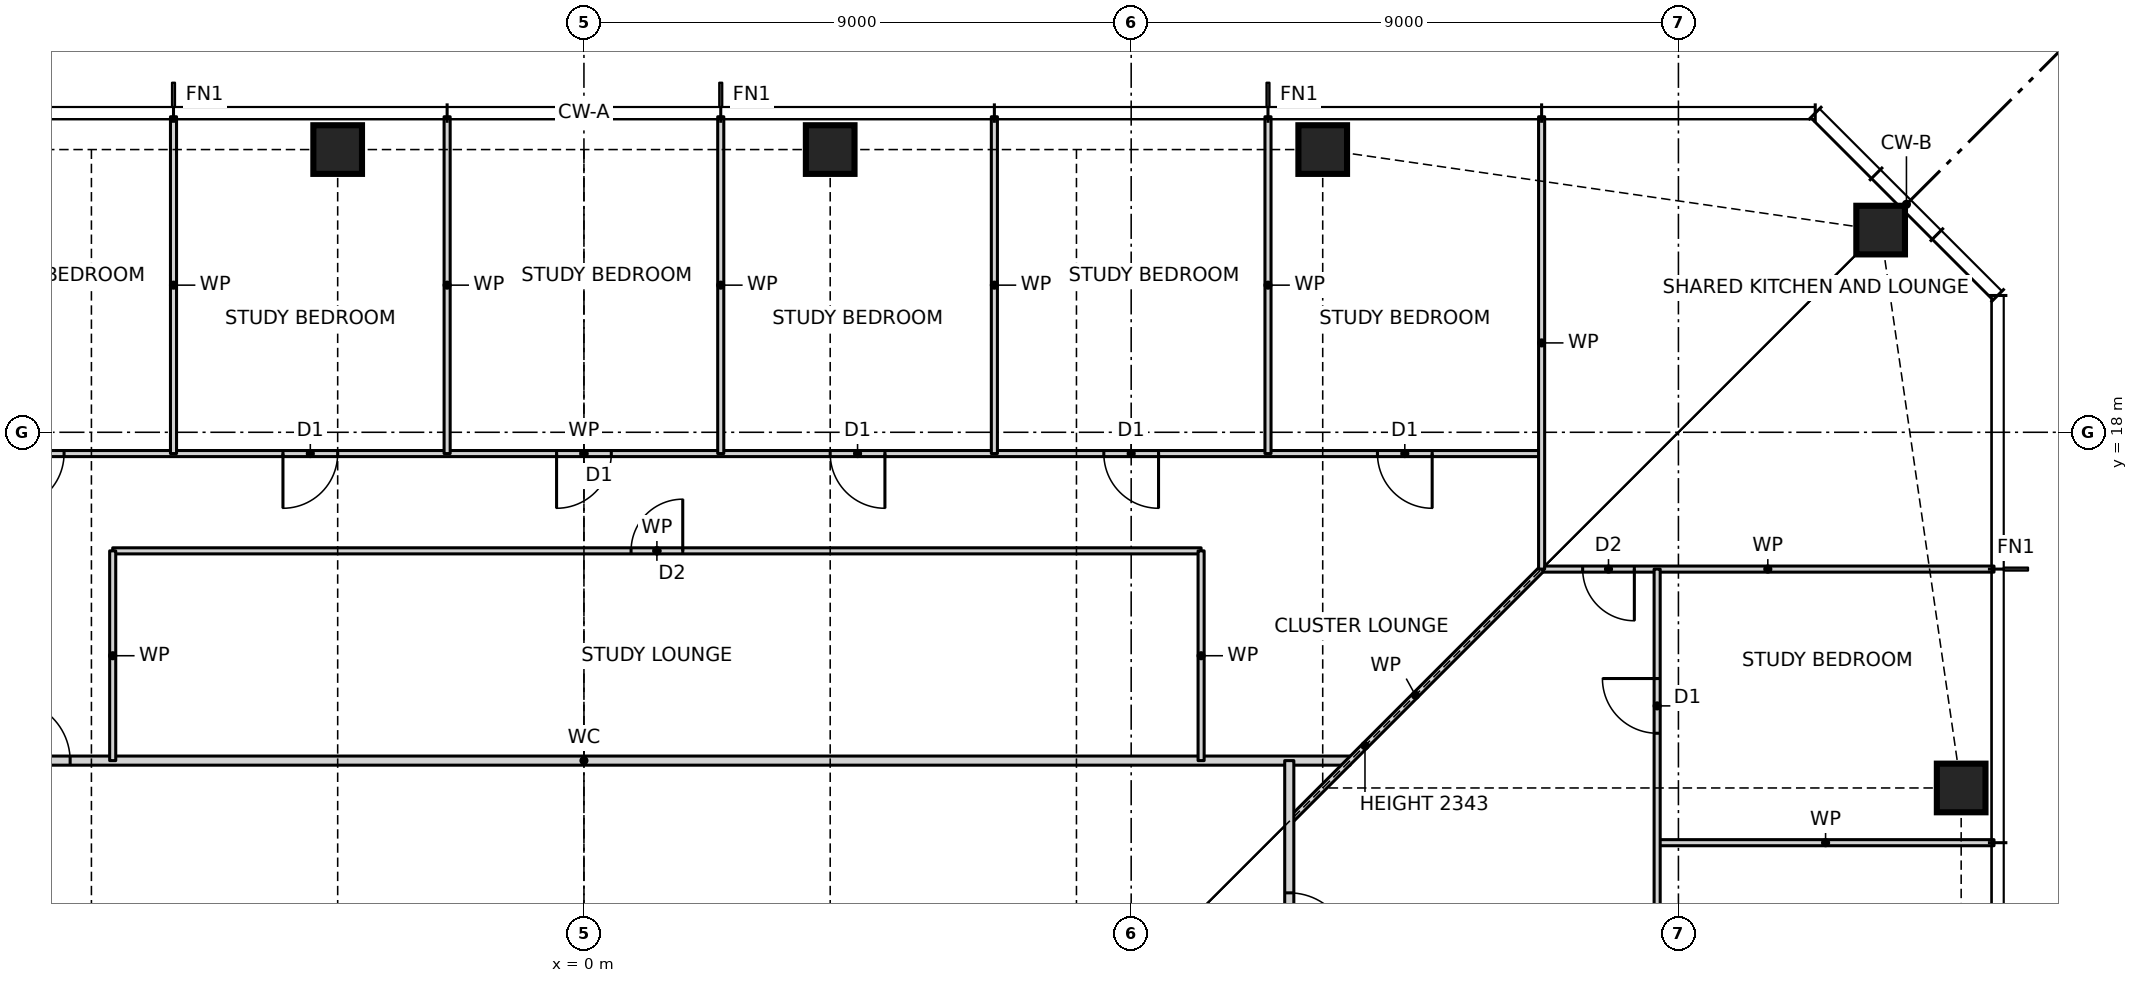
"""IFC4 building model, lengths in metres.
Left out: names, types, materials, properties, quantities, classifications, styles, units other than length and angle.
Written with IfcOpenShell. Run it as: python <this file> out.ifc"""

import sys

from ifc_helpers import new_model, si_unit, direction, frame, frame_2d, origin, origin_2d, place, context, subcontext, project, spatial, rectangle, hollow_rectangle, extrude, element, fill, save


model = new_model("IFC4")
c1 = context("Model", 3, precision=1e-05, world=origin(), true_north=direction((0.0, 1.0)))
c2 = subcontext(c1, "Body", "Model", "MODEL_VIEW")
j1 = project(units=[si_unit("LENGTHUNIT", "METRE"), si_unit("PLANEANGLEUNIT", "RADIAN")], contexts=[c1])
p1 = place(None, origin())
s1 = spatial("IfcSite", under=j1, at=p1, CompositionType="ELEMENT")
p2 = place(p1, origin())
s2 = spatial("IfcBuilding", under=s1, at=p2, CompositionType="ELEMENT")
p3 = place(p2, frame((0.0, 0.0, 43.0)))
s3 = spatial("IfcBuildingStorey", under=s2, at=p3, CompositionType="ELEMENT", Elevation=43.0)
for number, where, z_axis, x_axis in (
    (1, (22.65, 12.15, 0.0), (0.0, 0.0, 1.0), (1.0, 0.0, 0.0)),
    (2, (21.326, 21.326, 0.0), (0.0, 0.0, 1.0), (1.0, 0.0, 0.0)),
    (3, (12.15, 22.65, 0.0), (0.0, 0.0, 1.0), (1.0, 0.0, 0.0)),
    (4, (4.05, 22.65, 0.0), (0.0, 0.0, 1.0), (1.0, 0.0, 0.0)),
    (5, (-4.05, 22.65, 0.0), (0.0, 0.0, 1.0), (1.0, 0.0, 0.0)),
):
    element("IfcColumn", number, at=place(p3, frame(where, z_axis=z_axis, x_axis=x_axis)), inside=s3, PredefinedType="COLUMN", context=c2, shape_type="SweptSolid", body=[
        extrude(hollow_rectangle(XDim=0.8, YDim=0.8, WallThickness=0.09, at=origin_2d()), origin(), (0.0, 0.0, 1.0), 3.5),
    ])
p4 = place(p3, frame((17.65, 11.25, 0.0), z_axis=(0.0, 0.0, 1.0), x_axis=(1.0, 0.0, 0.0)))
e6 = element("IfcWall", 6, at=p4, inside=s3, PredefinedType="PARTITIONING", context=c2, shape_type="SweptSolid", body=[
    extrude(rectangle(XDim=5.54, YDim=0.1, at=frame_2d((2.77, 0.0))), origin(), (0.0, 0.0, 1.0), 3.27),
])
p5 = place(p3, frame((-12.6, 12.6, 0.0), z_axis=(0.0, 0.0, 1.0), x_axis=(1.0, 0.0, 0.0)))
e7 = element("IfcWall", 7, at=p5, inside=s3, PredefinedType="PARTITIONING", context=c2, shape_type="SweptSolid", body=[
    extrude(rectangle(XDim=25.2, YDim=0.15, at=frame_2d((12.6, 0.0))), origin(), (0.0, 0.0, 1.0), 3.27),
])
p6 = place(p5, frame((3.15, 0.0, 0.0)))
e8 = element("IfcOpeningElement", 8, at=p6, cuts=e7, PredefinedType="OPENING", context=c2, shape_type="SweptSolid", body=[
    extrude(rectangle(XDim=1.0, YDim=2.1, at=frame_2d((0.5, 1.05))), frame((0.0, 0.085, 0.0), z_axis=(0.0, -1.0, 0.0), x_axis=(1.0, 0.0, 0.0)), (0.0, 0.0, 1.0), 0.17),
])
p7 = place(p3, frame((15.75, 15.75, 0.0), z_axis=(0.0, 0.0, 1.0), x_axis=(1.0, 0.0, 0.0)))
e9 = element("IfcWall", 9, at=p7, inside=s3, PredefinedType="PARTITIONING", context=c2, shape_type="SweptSolid", body=[
    extrude(rectangle(XDim=7.44, YDim=0.1, at=frame_2d((3.72, 0.0))), origin(), (0.0, 0.0, 1.0), 3.27),
])
p8 = place(p7, frame((0.675, 0.0, 0.0)))
e10 = element("IfcOpeningElement", 10, at=p8, cuts=e9, PredefinedType="OPENING", context=c2, shape_type="SweptSolid", body=[
    extrude(rectangle(XDim=0.85, YDim=2.1, at=frame_2d((0.425, 1.05))), frame((0.0, 0.06, 0.0), z_axis=(0.0, -1.0, 0.0), x_axis=(1.0, 0.0, 0.0)), (0.0, 0.0, 1.0), 0.12),
])
p9 = place(p3, frame((-7.75, 16.05, 0.0), z_axis=(0.0, 0.0, 1.0), x_axis=(1.0, 0.0, 0.0)))
e11 = element("IfcWall", 11, at=p9, inside=s3, PredefinedType="PARTITIONING", context=c2, shape_type="SweptSolid", body=[
    extrude(rectangle(XDim=17.9, YDim=0.1, at=frame_2d((8.95, 0.0))), origin(), (0.0, 0.0, 1.0), 3.27),
])
p10 = place(p9, frame((8.525, 0.0, 0.0)))
e12 = element("IfcOpeningElement", 12, at=p10, cuts=e11, PredefinedType="OPENING", context=c2, shape_type="SweptSolid", body=[
    extrude(rectangle(XDim=0.85, YDim=2.1, at=frame_2d((0.425, 1.05))), frame((0.0, 0.06, 0.0), z_axis=(0.0, -1.0, 0.0), x_axis=(1.0, 0.0, 0.0)), (0.0, 0.0, 1.0), 0.12),
])
p11 = place(p3, frame((-15.75, 17.65, 0.0), z_axis=(0.0, 0.0, 1.0), x_axis=(1.0, 0.0, 0.0)))
e13 = element("IfcWall", 13, at=p11, inside=s3, PredefinedType="PARTITIONING", context=c2, shape_type="SweptSolid", body=[
    extrude(rectangle(XDim=31.5, YDim=0.1, at=frame_2d((15.75, 0.0))), origin(), (0.0, 0.0, 1.0), 3.27),
])
p12 = place(p11, frame((28.8, 0.0, 0.0)))
e14 = element("IfcOpeningElement", 14, at=p12, cuts=e13, PredefinedType="OPENING", context=c2, shape_type="SweptSolid", body=[
    extrude(rectangle(XDim=0.9, YDim=2.1, at=frame_2d((0.45, 1.05))), frame((0.0, 0.06, 0.0), z_axis=(0.0, -1.0, 0.0), x_axis=(1.0, 0.0, 0.0)), (0.0, 0.0, 1.0), 0.12),
])
p13 = place(p11, frame((24.3, 0.0, 0.0)))
e15 = element("IfcOpeningElement", 15, at=p13, cuts=e13, PredefinedType="OPENING", context=c2, shape_type="SweptSolid", body=[
    extrude(rectangle(XDim=0.9, YDim=2.1, at=frame_2d((0.45, 1.05))), frame((0.0, 0.06, 0.0), z_axis=(0.0, -1.0, 0.0), x_axis=(1.0, 0.0, 0.0)), (0.0, 0.0, 1.0), 0.12),
])
p14 = place(p11, frame((19.8, 0.0, 0.0)))
e16 = element("IfcOpeningElement", 16, at=p14, cuts=e13, PredefinedType="OPENING", context=c2, shape_type="SweptSolid", body=[
    extrude(rectangle(XDim=0.9, YDim=2.1, at=frame_2d((0.45, 1.05))), frame((0.0, 0.06, 0.0), z_axis=(0.0, -1.0, 0.0), x_axis=(1.0, 0.0, 0.0)), (0.0, 0.0, 1.0), 0.12),
])
p15 = place(p11, frame((15.3, 0.0, 0.0)))
e17 = element("IfcOpeningElement", 17, at=p15, cuts=e13, PredefinedType="OPENING", context=c2, shape_type="SweptSolid", body=[
    extrude(rectangle(XDim=0.9, YDim=2.1, at=frame_2d((0.45, 1.05))), frame((0.0, 0.06, 0.0), z_axis=(0.0, -1.0, 0.0), x_axis=(1.0, 0.0, 0.0)), (0.0, 0.0, 1.0), 0.12),
])
p16 = place(p11, frame((10.8, 0.0, 0.0)))
e18 = element("IfcOpeningElement", 18, at=p16, cuts=e13, PredefinedType="OPENING", context=c2, shape_type="SweptSolid", body=[
    extrude(rectangle(XDim=0.9, YDim=2.1, at=frame_2d((0.45, 1.05))), frame((0.0, 0.06, 0.0), z_axis=(0.0, -1.0, 0.0), x_axis=(1.0, 0.0, 0.0)), (0.0, 0.0, 1.0), 0.12),
])
p17 = place(p11, frame((6.3, 0.0, 0.0)))
e19 = element("IfcOpeningElement", 19, at=p17, cuts=e13, PredefinedType="OPENING", context=c2, shape_type="SweptSolid", body=[
    extrude(rectangle(XDim=0.9, YDim=2.1, at=frame_2d((0.45, 1.05))), frame((0.0, 0.06, 0.0), z_axis=(0.0, -1.0, 0.0), x_axis=(1.0, 0.0, 0.0)), (0.0, 0.0, 1.0), 0.12),
])
p18 = place(p11, frame((1.8, 0.0, 0.0)))
e20 = element("IfcOpeningElement", 20, at=p18, cuts=e13, PredefinedType="OPENING", context=c2, shape_type="SweptSolid", body=[
    extrude(rectangle(XDim=0.9, YDim=2.1, at=frame_2d((0.45, 1.05))), frame((0.0, 0.06, 0.0), z_axis=(0.0, -1.0, 0.0), x_axis=(1.0, 0.0, 0.0)), (0.0, 0.0, 1.0), 0.12),
])
p19 = place(p3, frame((11.6, 11.6, 0.0), z_axis=(0.0, 0.0, 1.0), x_axis=(0.707106781187, 0.707106781187, 0.0)))
e21 = element("IfcWall", 21, at=p19, inside=s3, PredefinedType="PARTITIONING", context=c2, shape_type="SweptSolid", body=[
    extrude(rectangle(XDim=5.869, YDim=0.1, at=frame_2d((2.935, 0.0))), origin(), (0.0, 0.0, 1.0), 2.343),
])
p20 = place(p3, frame((17.65, -11.25, 0.0), z_axis=(0.0, 0.0, 1.0), x_axis=(0.0, 1.0, 0.0)))
e22 = element("IfcWall", 22, at=p20, inside=s3, PredefinedType="PARTITIONING", context=c2, shape_type="SweptSolid", body=[
    extrude(rectangle(XDim=27.0, YDim=0.1, at=frame_2d((13.5, 0.0))), origin(), (0.0, 0.0, 1.0), 3.0),
])
p21 = place(p20, frame((1.8, 0.0, 0.0)))
e23 = element("IfcOpeningElement", 23, at=p21, cuts=e22, PredefinedType="OPENING", context=c2, shape_type="SweptSolid", body=[
    extrude(rectangle(XDim=0.9, YDim=2.1, at=frame_2d((0.45, 1.05))), frame((0.0, 0.06, 0.0), z_axis=(0.0, -1.0, 0.0), x_axis=(1.0, 0.0, 0.0)), (0.0, 0.0, 1.0), 0.12),
])
p22 = place(p20, frame((6.3, 0.0, 0.0)))
e24 = element("IfcOpeningElement", 24, at=p22, cuts=e22, PredefinedType="OPENING", context=c2, shape_type="SweptSolid", body=[
    extrude(rectangle(XDim=0.9, YDim=2.1, at=frame_2d((0.45, 1.05))), frame((0.0, 0.06, 0.0), z_axis=(0.0, -1.0, 0.0), x_axis=(1.0, 0.0, 0.0)), (0.0, 0.0, 1.0), 0.12),
])
p23 = place(p20, frame((10.8, 0.0, 0.0)))
e25 = element("IfcOpeningElement", 25, at=p23, cuts=e22, PredefinedType="OPENING", context=c2, shape_type="SweptSolid", body=[
    extrude(rectangle(XDim=0.9, YDim=2.1, at=frame_2d((0.45, 1.05))), frame((0.0, 0.06, 0.0), z_axis=(0.0, -1.0, 0.0), x_axis=(1.0, 0.0, 0.0)), (0.0, 0.0, 1.0), 0.12),
])
p24 = place(p20, frame((15.3, 0.0, 0.0)))
e26 = element("IfcOpeningElement", 26, at=p24, cuts=e22, PredefinedType="OPENING", context=c2, shape_type="SweptSolid", body=[
    extrude(rectangle(XDim=0.9, YDim=2.1, at=frame_2d((0.45, 1.05))), frame((0.0, 0.06, 0.0), z_axis=(0.0, -1.0, 0.0), x_axis=(1.0, 0.0, 0.0)), (0.0, 0.0, 1.0), 0.12),
])
p25 = place(p20, frame((19.8, 0.0, 0.0)))
e27 = element("IfcOpeningElement", 27, at=p25, cuts=e22, PredefinedType="OPENING", context=c2, shape_type="SweptSolid", body=[
    extrude(rectangle(XDim=0.9, YDim=2.1, at=frame_2d((0.45, 1.05))), frame((0.0, 0.06, 0.0), z_axis=(0.0, -1.0, 0.0), x_axis=(1.0, 0.0, 0.0)), (0.0, 0.0, 1.0), 0.12),
])
p26 = place(p20, frame((24.3, 0.0, 0.0)))
e28 = element("IfcOpeningElement", 28, at=p26, cuts=e22, PredefinedType="OPENING", context=c2, shape_type="SweptSolid", body=[
    extrude(rectangle(XDim=0.9, YDim=2.1, at=frame_2d((0.45, 1.05))), frame((0.0, 0.06, 0.0), z_axis=(0.0, -1.0, 0.0), x_axis=(1.0, 0.0, 0.0)), (0.0, 0.0, 1.0), 0.12),
])
p27 = place(p3, frame((15.75, 15.75, 0.0), z_axis=(0.0, 0.0, 1.0), x_axis=(0.0, 1.0, 0.0)))
e29 = element("IfcWall", 29, at=p27, inside=s3, PredefinedType="PARTITIONING", context=c2, shape_type="SweptSolid", body=[
    extrude(rectangle(XDim=7.44, YDim=0.1, at=frame_2d((3.72, 0.0))), origin(), (0.0, 0.0, 1.0), 3.27),
])
p28 = place(p3, frame((11.6, -11.6, 0.0), z_axis=(0.0, 0.0, 1.0), x_axis=(0.0, 1.0, 0.0)))
e30 = element("IfcWall", 30, at=p28, inside=s3, PredefinedType="PARTITIONING", context=c2, shape_type="SweptSolid", body=[
    extrude(rectangle(XDim=24.2, YDim=0.15, at=frame_2d((12.1, 0.0))), origin(), (0.0, 0.0, 1.0), 3.27),
])
p29 = place(p28, frame((3.6, 0.0, 0.0)))
e31 = element("IfcOpeningElement", 31, at=p29, cuts=e30, PredefinedType="OPENING", context=c2, shape_type="SweptSolid", body=[
    extrude(rectangle(XDim=1.0, YDim=2.1, at=frame_2d((0.5, 1.05))), frame((0.0, 0.085, 0.0), z_axis=(0.0, -1.0, 0.0), x_axis=(1.0, 0.0, 0.0)), (0.0, 0.0, 1.0), 0.17),
])
p30 = place(p28, frame((21.025, 0.0, 0.0)))
e32 = element("IfcOpeningElement", 32, at=p30, cuts=e30, PredefinedType="OPENING", context=c2, shape_type="SweptSolid", body=[
    extrude(rectangle(XDim=1.0, YDim=2.1, at=frame_2d((0.5, 1.05))), frame((0.0, 0.085, 0.0), z_axis=(0.0, -1.0, 0.0), x_axis=(1.0, 0.0, 0.0)), (0.0, 0.0, 1.0), 0.17),
])
p31 = place(p3, frame((11.25, 17.65, 0.0), z_axis=(0.0, 0.0, 1.0), x_axis=(0.0, 1.0, 0.0)))
e33 = element("IfcWall", 33, at=p31, inside=s3, PredefinedType="PARTITIONING", context=c2, shape_type="SweptSolid", body=[
    extrude(rectangle(XDim=5.54, YDim=0.1, at=frame_2d((2.77, 0.0))), origin(), (0.0, 0.0, 1.0), 3.27),
])
p32 = place(p3, frame((10.15, 12.6, 0.0), z_axis=(0.0, 0.0, 1.0), x_axis=(0.0, 1.0, 0.0)))
e34 = element("IfcWall", 34, at=p32, inside=s3, PredefinedType="PARTITIONING", context=c2, shape_type="SweptSolid", body=[
    extrude(rectangle(XDim=3.45, YDim=0.1, at=frame_2d((1.725, 0.0))), origin(), (0.0, 0.0, 1.0), 3.27),
])
for number, where, z_axis, x_axis in (
    (35, (6.75, 17.65, 0.0), (0.0, 0.0, 1.0), (0.0, 1.0, 0.0)),
    (36, (2.25, 17.65, 0.0), (0.0, 0.0, 1.0), (0.0, 1.0, 0.0)),
    (37, (-2.25, 17.65, 0.0), (0.0, 0.0, 1.0), (0.0, 1.0, 0.0)),
    (38, (-6.75, 17.65, 0.0), (0.0, 0.0, 1.0), (0.0, 1.0, 0.0)),
):
    element("IfcWall", number, at=place(p3, frame(where, z_axis=z_axis, x_axis=x_axis)), inside=s3, PredefinedType="PARTITIONING", context=c2, shape_type="SweptSolid", body=[
        extrude(rectangle(XDim=5.54, YDim=0.1, at=frame_2d((2.77, 0.0))), origin(), (0.0, 0.0, 1.0), 3.27),
    ])
p33 = place(p3, frame((-7.75, 12.6, 0.0), z_axis=(0.0, 0.0, 1.0), x_axis=(0.0, 1.0, 0.0)))
e39 = element("IfcWall", 39, at=p33, inside=s3, PredefinedType="PARTITIONING", context=c2, shape_type="SweptSolid", body=[
    extrude(rectangle(XDim=3.45, YDim=0.1, at=frame_2d((1.725, 0.0))), origin(), (0.0, 0.0, 1.0), 3.27),
])
p34 = place(p26, origin())
e40 = element("IfcDoor", 40, at=p34, inside=s3, OperationType="SINGLE_SWING_RIGHT", PredefinedType="DOOR", context=c2, shape_type="SweptSolid", body=[
    extrude(rectangle(XDim=0.9, YDim=2.1, at=frame_2d((0.45, 1.05))), frame((0.0, 0.025, 0.0), z_axis=(0.0, -1.0, 0.0), x_axis=(1.0, 0.0, 0.0)), (0.0, 0.0, 1.0), 0.05),
])
fill(e28, e40)
p35 = place(p30, frame((1.0, 0.0, 0.0), z_axis=(0.0, 0.0, 1.0), x_axis=(-1.0, 0.0, 0.0)))
e41 = element("IfcDoor", 41, at=p35, inside=s3, OperationType="SINGLE_SWING_RIGHT", PredefinedType="DOOR", context=c2, shape_type="SweptSolid", body=[
    extrude(rectangle(XDim=1.0, YDim=2.1, at=frame_2d((0.5, 1.05))), frame((0.0, 0.025, 0.0), z_axis=(0.0, -1.0, 0.0), x_axis=(1.0, 0.0, 0.0)), (0.0, 0.0, 1.0), 0.05),
])
fill(e32, e41)
p36 = place(p12, frame((0.9, 0.0, 0.0), z_axis=(0.0, 0.0, 1.0), x_axis=(-1.0, 0.0, 0.0)))
e42 = element("IfcDoor", 42, at=p36, inside=s3, OperationType="SINGLE_SWING_LEFT", PredefinedType="DOOR", context=c2, shape_type="SweptSolid", body=[
    extrude(rectangle(XDim=0.9, YDim=2.1, at=frame_2d((0.45, 1.05))), frame((0.0, 0.025, 0.0), z_axis=(0.0, -1.0, 0.0), x_axis=(1.0, 0.0, 0.0)), (0.0, 0.0, 1.0), 0.05),
])
fill(e14, e42)
p37 = place(p13, frame((0.9, 0.0, 0.0), z_axis=(0.0, 0.0, 1.0), x_axis=(-1.0, 0.0, 0.0)))
e43 = element("IfcDoor", 43, at=p37, inside=s3, OperationType="SINGLE_SWING_LEFT", PredefinedType="DOOR", context=c2, shape_type="SweptSolid", body=[
    extrude(rectangle(XDim=0.9, YDim=2.1, at=frame_2d((0.45, 1.05))), frame((0.0, 0.025, 0.0), z_axis=(0.0, -1.0, 0.0), x_axis=(1.0, 0.0, 0.0)), (0.0, 0.0, 1.0), 0.05),
])
fill(e15, e43)
p38 = place(p14, frame((0.9, 0.0, 0.0), z_axis=(0.0, 0.0, 1.0), x_axis=(-1.0, 0.0, 0.0)))
e44 = element("IfcDoor", 44, at=p38, inside=s3, OperationType="SINGLE_SWING_LEFT", PredefinedType="DOOR", context=c2, shape_type="SweptSolid", body=[
    extrude(rectangle(XDim=0.9, YDim=2.1, at=frame_2d((0.45, 1.05))), frame((0.0, 0.025, 0.0), z_axis=(0.0, -1.0, 0.0), x_axis=(1.0, 0.0, 0.0)), (0.0, 0.0, 1.0), 0.05),
])
fill(e16, e44)
p39 = place(p15, frame((0.9, 0.0, 0.0), z_axis=(0.0, 0.0, 1.0), x_axis=(-1.0, 0.0, 0.0)))
e45 = element("IfcDoor", 45, at=p39, inside=s3, OperationType="SINGLE_SWING_RIGHT", PredefinedType="DOOR", context=c2, shape_type="SweptSolid", body=[
    extrude(rectangle(XDim=0.9, YDim=2.1, at=frame_2d((0.45, 1.05))), frame((0.0, 0.025, 0.0), z_axis=(0.0, -1.0, 0.0), x_axis=(1.0, 0.0, 0.0)), (0.0, 0.0, 1.0), 0.05),
])
fill(e17, e45)
p40 = place(p16, frame((0.9, 0.0, 0.0), z_axis=(0.0, 0.0, 1.0), x_axis=(-1.0, 0.0, 0.0)))
e46 = element("IfcDoor", 46, at=p40, inside=s3, OperationType="SINGLE_SWING_RIGHT", PredefinedType="DOOR", context=c2, shape_type="SweptSolid", body=[
    extrude(rectangle(XDim=0.9, YDim=2.1, at=frame_2d((0.45, 1.05))), frame((0.0, 0.025, 0.0), z_axis=(0.0, -1.0, 0.0), x_axis=(1.0, 0.0, 0.0)), (0.0, 0.0, 1.0), 0.05),
])
fill(e18, e46)
p41 = place(p17, frame((0.9, 0.0, 0.0), z_axis=(0.0, 0.0, 1.0), x_axis=(-1.0, 0.0, 0.0)))
e47 = element("IfcDoor", 47, at=p41, inside=s3, OperationType="SINGLE_SWING_RIGHT", PredefinedType="DOOR", context=c2, shape_type="SweptSolid", body=[
    extrude(rectangle(XDim=0.9, YDim=2.1, at=frame_2d((0.45, 1.05))), frame((0.0, 0.025, 0.0), z_axis=(0.0, -1.0, 0.0), x_axis=(1.0, 0.0, 0.0)), (0.0, 0.0, 1.0), 0.05),
])
fill(e19, e47)
p42 = place(p6, origin())
e48 = element("IfcDoor", 48, at=p42, inside=s3, OperationType="SINGLE_SWING_LEFT", PredefinedType="DOOR", context=c2, shape_type="SweptSolid", body=[
    extrude(rectangle(XDim=1.0, YDim=2.1, at=frame_2d((0.5, 1.05))), frame((0.0, 0.025, 0.0), z_axis=(0.0, -1.0, 0.0), x_axis=(1.0, 0.0, 0.0)), (0.0, 0.0, 1.0), 0.05),
])
fill(e8, e48)
p43 = place(p10, origin())
e49 = element("IfcDoor", 49, at=p43, inside=s3, OperationType="SINGLE_SWING_RIGHT", PredefinedType="DOOR", context=c2, shape_type="SweptSolid", body=[
    extrude(rectangle(XDim=0.85, YDim=2.1, at=frame_2d((0.425, 1.05))), frame((0.0, 0.025, 0.0), z_axis=(0.0, -1.0, 0.0), x_axis=(1.0, 0.0, 0.0)), (0.0, 0.0, 1.0), 0.05),
])
fill(e12, e49)
p44 = place(p8, frame((0.85, 0.0, 0.0), z_axis=(0.0, 0.0, 1.0), x_axis=(-1.0, 0.0, 0.0)))
e50 = element("IfcDoor", 50, at=p44, inside=s3, OperationType="SINGLE_SWING_LEFT", PredefinedType="DOOR", context=c2, shape_type="SweptSolid", body=[
    extrude(rectangle(XDim=0.85, YDim=2.1, at=frame_2d((0.425, 1.05))), frame((0.0, 0.025, 0.0), z_axis=(0.0, -1.0, 0.0), x_axis=(1.0, 0.0, 0.0)), (0.0, 0.0, 1.0), 0.05),
])
fill(e10, e50)
save(model, sys.argv[1])
